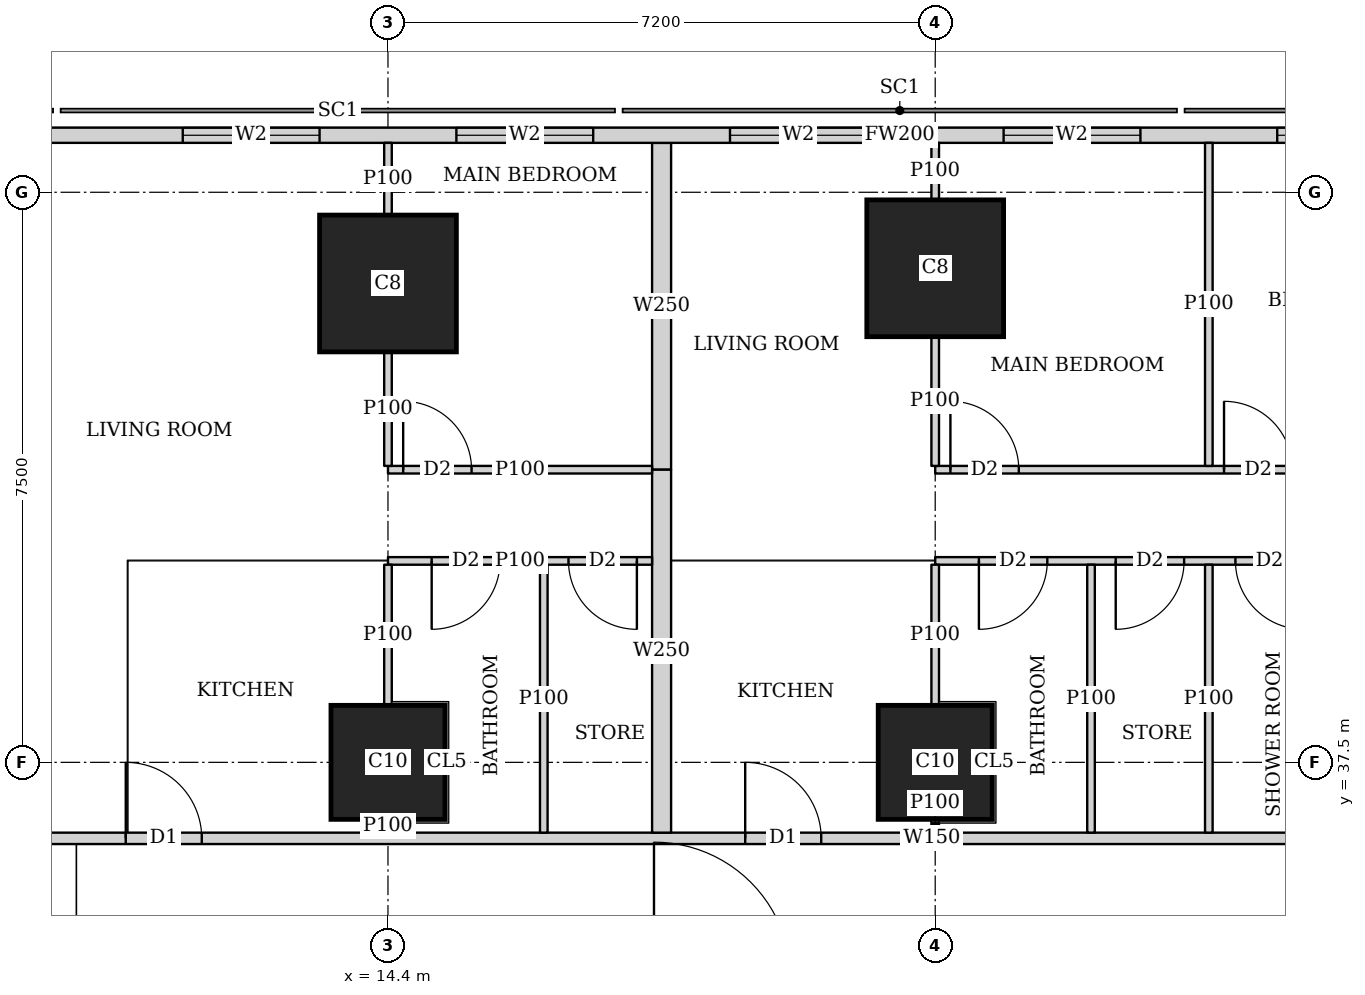
"""IFC4 building model, lengths in metres.
Left out: names, types, materials, properties, quantities, classifications, styles, units other than length and angle.
Written with IfcOpenShell. Run it as: python <this file> out.ifc"""

import sys

from ifc_helpers import new_model, si_unit, direction, frame, frame_2d, origin, origin_2d, place, context, subcontext, project, spatial, rectangle, extrude, element, fill, save


model = new_model("IFC4")
c1 = context("Model", 3, precision=1e-05, world=origin(), true_north=direction((0.0, 1.0)))
c2 = subcontext(c1, "Body", "Model", "MODEL_VIEW")
j1 = project(units=[si_unit("LENGTHUNIT", "METRE"), si_unit("PLANEANGLEUNIT", "RADIAN")], contexts=[c1])
p1 = place(None, origin())
s1 = spatial("IfcSite", under=j1, at=p1, CompositionType="ELEMENT")
p2 = place(p1, origin())
s2 = spatial("IfcBuilding", under=s1, at=p2, CompositionType="ELEMENT")
p3 = place(p2, frame((0.0, 0.0, 139.55)))
s3 = spatial("IfcBuildingStorey", under=s2, at=p3, CompositionType="ELEMENT", Elevation=139.55)
for number, where, z_axis, x_axis in (
    (1, (14.4, 37.5, 0.0), (0.0, 0.0, 1.0), (1.0, 0.0, 0.0)),
    (2, (21.6, 37.5, 0.0), (0.0, 0.0, 1.0), (1.0, 0.0, 0.0)),
):
    element("IfcColumn", number, at=place(p3, frame(where, z_axis=z_axis, x_axis=x_axis)), inside=s3, PredefinedType="COLUMN", context=c2, shape_type="SweptSolid", body=[
        extrude(rectangle(XDim=1.5, YDim=1.5, at=origin_2d()), origin(), (0.0, 0.0, 1.0), 3.75),
    ])
for number, where, z_axis, x_axis in (
    (3, (14.4, 43.8, 0.0), (0.0, 0.0, 1.0), (1.0, 0.0, 0.0)),
    (4, (21.6, 44.0, 0.0), (0.0, 0.0, 1.0), (1.0, 0.0, 0.0)),
):
    element("IfcColumn", number, at=place(p3, frame(where, z_axis=z_axis, x_axis=x_axis)), inside=s3, PredefinedType="COLUMN", context=c2, shape_type="SweptSolid", body=[
        extrude(rectangle(XDim=1.8, YDim=1.8, at=origin_2d()), origin(), (0.0, 0.0, 1.0), 3.75),
    ])
p4 = place(p3, frame((40.106, 45.75, 0.0), z_axis=(0.0, 0.0, 1.0), x_axis=(-1.0, 0.0, 0.0)))
e5 = element("IfcWall", 5, at=p4, inside=s3, PredefinedType="SOLIDWALL", context=c2, shape_type="SweptSolid", body=[
    extrude(rectangle(XDim=37.943, YDim=0.2, at=frame_2d((18.971, 0.0))), origin(), (0.0, 0.0, 1.0), 3.5),
])
p5 = place(p4, frame((8.606, 0.0, 0.9)))
e6 = element("IfcOpeningElement", 6, at=p5, cuts=e5, PredefinedType="OPENING", context=c2, shape_type="SweptSolid", body=[
    extrude(rectangle(XDim=1.8, YDim=1.5, at=frame_2d((0.9, 0.75))), frame((0.0, 0.11, 0.0), z_axis=(0.0, -1.0, 0.0), x_axis=(1.0, 0.0, 0.0)), (0.0, 0.0, 1.0), 0.22),
])
p6 = place(p4, frame((12.206, 0.0, 0.9)))
e7 = element("IfcOpeningElement", 7, at=p6, cuts=e5, PredefinedType="OPENING", context=c2, shape_type="SweptSolid", body=[
    extrude(rectangle(XDim=1.8, YDim=1.5, at=frame_2d((0.9, 0.75))), frame((0.0, 0.11, 0.0), z_axis=(0.0, -1.0, 0.0), x_axis=(1.0, 0.0, 0.0)), (0.0, 0.0, 1.0), 0.22),
])
p7 = place(p4, frame((15.806, 0.0, 0.9)))
e8 = element("IfcOpeningElement", 8, at=p7, cuts=e5, PredefinedType="OPENING", context=c2, shape_type="SweptSolid", body=[
    extrude(rectangle(XDim=1.8, YDim=1.5, at=frame_2d((0.9, 0.75))), frame((0.0, 0.11, 0.0), z_axis=(0.0, -1.0, 0.0), x_axis=(1.0, 0.0, 0.0)), (0.0, 0.0, 1.0), 0.22),
])
p8 = place(p4, frame((19.406, 0.0, 0.9)))
e9 = element("IfcOpeningElement", 9, at=p8, cuts=e5, PredefinedType="OPENING", context=c2, shape_type="SweptSolid", body=[
    extrude(rectangle(XDim=1.8, YDim=1.5, at=frame_2d((0.9, 0.75))), frame((0.0, 0.11, 0.0), z_axis=(0.0, -1.0, 0.0), x_axis=(1.0, 0.0, 0.0)), (0.0, 0.0, 1.0), 0.22),
])
p9 = place(p4, frame((23.006, 0.0, 0.9)))
e10 = element("IfcOpeningElement", 10, at=p9, cuts=e5, PredefinedType="OPENING", context=c2, shape_type="SweptSolid", body=[
    extrude(rectangle(XDim=1.8, YDim=1.5, at=frame_2d((0.9, 0.75))), frame((0.0, 0.11, 0.0), z_axis=(0.0, -1.0, 0.0), x_axis=(1.0, 0.0, 0.0)), (0.0, 0.0, 1.0), 0.22),
])
p10 = place(p4, frame((26.606, 0.0, 0.9)))
e11 = element("IfcOpeningElement", 11, at=p10, cuts=e5, PredefinedType="OPENING", context=c2, shape_type="SweptSolid", body=[
    extrude(rectangle(XDim=1.8, YDim=1.5, at=frame_2d((0.9, 0.75))), frame((0.0, 0.11, 0.0), z_axis=(0.0, -1.0, 0.0), x_axis=(1.0, 0.0, 0.0)), (0.0, 0.0, 1.0), 0.22),
])
p11 = place(p3, frame((8.35, 36.5, 0.0), z_axis=(0.0, 0.0, 1.0), x_axis=(1.0, 0.0, 0.0)))
e12 = element("IfcWall", 12, at=p11, inside=s3, PredefinedType="SOLIDWALL", context=c2, shape_type="SweptSolid", body=[
    extrude(rectangle(XDim=26.415, YDim=0.15, at=frame_2d((13.208, 0.0))), origin(), (0.0, 0.0, 1.0), 3.5),
])
p12 = place(p11, frame((2.6, 0.0, 0.0)))
e13 = element("IfcOpeningElement", 13, at=p12, cuts=e12, PredefinedType="OPENING", context=c2, shape_type="SweptSolid", body=[
    extrude(rectangle(XDim=1.0, YDim=2.1, at=frame_2d((0.5, 1.05))), frame((0.0, 0.085, 0.0), z_axis=(0.0, -1.0, 0.0), x_axis=(1.0, 0.0, 0.0)), (0.0, 0.0, 1.0), 0.17),
])
p13 = place(p11, frame((10.75, 0.0, 0.0)))
e14 = element("IfcOpeningElement", 14, at=p13, cuts=e12, PredefinedType="OPENING", context=c2, shape_type="SweptSolid", body=[
    extrude(rectangle(XDim=1.0, YDim=2.1, at=frame_2d((0.5, 1.05))), frame((0.0, 0.085, 0.0), z_axis=(0.0, -1.0, 0.0), x_axis=(1.0, 0.0, 0.0)), (0.0, 0.0, 1.0), 0.17),
])
p14 = place(p3, frame((14.4, 41.35, 0.0), z_axis=(0.0, 0.0, 1.0), x_axis=(1.0, 0.0, 0.0)))
e15 = element("IfcWall", 15, at=p14, inside=s3, PredefinedType="PARTITIONING", context=c2, shape_type="SweptSolid", body=[
    extrude(rectangle(XDim=3.475, YDim=0.1, at=frame_2d((1.738, 0.0))), origin(), (0.0, 0.0, 1.0), 3.5),
])
p15 = place(p14, frame((0.2, 0.0, 0.0)))
e16 = element("IfcOpeningElement", 16, at=p15, cuts=e15, PredefinedType="OPENING", context=c2, shape_type="SweptSolid", body=[
    extrude(rectangle(XDim=0.9, YDim=2.1, at=frame_2d((0.45, 1.05))), frame((0.0, 0.06, 0.0), z_axis=(0.0, -1.0, 0.0), x_axis=(1.0, 0.0, 0.0)), (0.0, 0.0, 1.0), 0.12),
])
p16 = place(p3, frame((14.4, 40.15, 0.0), z_axis=(0.0, 0.0, 1.0), x_axis=(1.0, 0.0, 0.0)))
e17 = element("IfcWall", 17, at=p16, inside=s3, PredefinedType="PARTITIONING", context=c2, shape_type="SweptSolid", body=[
    extrude(rectangle(XDim=3.475, YDim=0.1, at=frame_2d((1.738, 0.0))), origin(), (0.0, 0.0, 1.0), 3.5),
])
p17 = place(p16, frame((0.575, 0.0, 0.0)))
e18 = element("IfcOpeningElement", 18, at=p17, cuts=e17, PredefinedType="OPENING", context=c2, shape_type="SweptSolid", body=[
    extrude(rectangle(XDim=0.9, YDim=2.1, at=frame_2d((0.45, 1.05))), frame((0.0, 0.06, 0.0), z_axis=(0.0, -1.0, 0.0), x_axis=(1.0, 0.0, 0.0)), (0.0, 0.0, 1.0), 0.12),
])
p18 = place(p16, frame((2.375, 0.0, 0.0)))
e19 = element("IfcOpeningElement", 19, at=p18, cuts=e17, PredefinedType="OPENING", context=c2, shape_type="SweptSolid", body=[
    extrude(rectangle(XDim=0.9, YDim=2.1, at=frame_2d((0.45, 1.05))), frame((0.0, 0.06, 0.0), z_axis=(0.0, -1.0, 0.0), x_axis=(1.0, 0.0, 0.0)), (0.0, 0.0, 1.0), 0.12),
])
p19 = place(p3, frame((14.4, 41.4, 0.0), z_axis=(0.0, 0.0, 1.0), x_axis=(0.0, 1.0, 0.0)))
e20 = element("IfcWall", 20, at=p19, inside=s3, PredefinedType="PARTITIONING", context=c2, shape_type="SweptSolid", body=[
    extrude(rectangle(XDim=1.499, YDim=0.1, at=frame_2d((0.75, 0.0))), origin(), (0.0, 0.0, 1.0), 3.5),
])
p20 = place(p3, frame((14.4, 44.701, 0.0), z_axis=(0.0, 0.0, 1.0), x_axis=(0.0, 1.0, 0.0)))
e21 = element("IfcWall", 21, at=p20, inside=s3, PredefinedType="PARTITIONING", context=c2, shape_type="SweptSolid", body=[
    extrude(rectangle(XDim=0.949, YDim=0.1, at=frame_2d((0.475, 0.0))), origin(), (0.0, 0.0, 1.0), 3.5),
])
p21 = place(p3, frame((14.4, 36.575, 0.0), z_axis=(0.0, 0.0, 1.0), x_axis=(0.0, 1.0, 0.0)))
e22 = element("IfcWall", 22, at=p21, inside=s3, PredefinedType="PARTITIONING", context=c2, shape_type="SweptSolid", body=[
    extrude(rectangle(XDim=0.174, YDim=0.1, at=frame_2d((0.087, 0.0))), origin(), (0.0, 0.0, 1.0), 3.5),
])
p22 = place(p3, frame((14.4, 38.251, 0.0), z_axis=(0.0, 0.0, 1.0), x_axis=(0.0, 1.0, 0.0)))
e23 = element("IfcWall", 23, at=p22, inside=s3, PredefinedType="PARTITIONING", context=c2, shape_type="SweptSolid", body=[
    extrude(rectangle(XDim=1.849, YDim=0.1, at=frame_2d((0.925, 0.0))), origin(), (0.0, 0.0, 1.0), 3.5),
])
p23 = place(p3, frame((16.45, 36.575, 0.0), z_axis=(0.0, 0.0, 1.0), x_axis=(0.0, 1.0, 0.0)))
e24 = element("IfcWall", 24, at=p23, inside=s3, PredefinedType="PARTITIONING", context=c2, shape_type="SweptSolid", body=[
    extrude(rectangle(XDim=3.525, YDim=0.1, at=frame_2d((1.763, 0.0))), origin(), (0.0, 0.0, 1.0), 3.5),
])
p24 = place(p3, frame((21.6, 41.35, 0.0), z_axis=(0.0, 0.0, 1.0), x_axis=(1.0, 0.0, 0.0)))
e25 = element("IfcWall", 25, at=p24, inside=s3, PredefinedType="PARTITIONING", context=c2, shape_type="SweptSolid", body=[
    extrude(rectangle(XDim=12.253, YDim=0.1, at=frame_2d((6.126, 0.0))), origin(), (0.0, 0.0, 1.0), 3.5),
])
p25 = place(p24, frame((0.2, 0.0, 0.0)))
e26 = element("IfcOpeningElement", 26, at=p25, cuts=e25, PredefinedType="OPENING", context=c2, shape_type="SweptSolid", body=[
    extrude(rectangle(XDim=0.9, YDim=2.1, at=frame_2d((0.45, 1.05))), frame((0.0, 0.06, 0.0), z_axis=(0.0, -1.0, 0.0), x_axis=(1.0, 0.0, 0.0)), (0.0, 0.0, 1.0), 0.12),
])
p26 = place(p24, frame((3.8, 0.0, 0.0)))
e27 = element("IfcOpeningElement", 27, at=p26, cuts=e25, PredefinedType="OPENING", context=c2, shape_type="SweptSolid", body=[
    extrude(rectangle(XDim=0.9, YDim=2.1, at=frame_2d((0.45, 1.05))), frame((0.0, 0.06, 0.0), z_axis=(0.0, -1.0, 0.0), x_axis=(1.0, 0.0, 0.0)), (0.0, 0.0, 1.0), 0.12),
])
p27 = place(p24, frame((7.4, 0.0, 0.0)))
e28 = element("IfcOpeningElement", 28, at=p27, cuts=e25, PredefinedType="OPENING", context=c2, shape_type="SweptSolid", body=[
    extrude(rectangle(XDim=0.9, YDim=2.1, at=frame_2d((0.45, 1.05))), frame((0.0, 0.06, 0.0), z_axis=(0.0, -1.0, 0.0), x_axis=(1.0, 0.0, 0.0)), (0.0, 0.0, 1.0), 0.12),
])
p28 = place(p3, frame((21.6, 40.15, 0.0), z_axis=(0.0, 0.0, 1.0), x_axis=(1.0, 0.0, 0.0)))
e29 = element("IfcWall", 29, at=p28, inside=s3, PredefinedType="PARTITIONING", context=c2, shape_type="SweptSolid", body=[
    extrude(rectangle(XDim=12.48, YDim=0.1, at=frame_2d((6.24, 0.0))), origin(), (0.0, 0.0, 1.0), 3.5),
])
p29 = place(p28, frame((0.575, 0.0, 0.0)))
e30 = element("IfcOpeningElement", 30, at=p29, cuts=e29, PredefinedType="OPENING", context=c2, shape_type="SweptSolid", body=[
    extrude(rectangle(XDim=0.9, YDim=2.1, at=frame_2d((0.45, 1.05))), frame((0.0, 0.06, 0.0), z_axis=(0.0, -1.0, 0.0), x_axis=(1.0, 0.0, 0.0)), (0.0, 0.0, 1.0), 0.12),
])
p30 = place(p28, frame((3.95, 0.0, 0.0)))
e31 = element("IfcOpeningElement", 31, at=p30, cuts=e29, PredefinedType="OPENING", context=c2, shape_type="SweptSolid", body=[
    extrude(rectangle(XDim=0.9, YDim=2.1, at=frame_2d((0.45, 1.05))), frame((0.0, 0.06, 0.0), z_axis=(0.0, -1.0, 0.0), x_axis=(1.0, 0.0, 0.0)), (0.0, 0.0, 1.0), 0.12),
])
p31 = place(p28, frame((7.6, 0.0, 0.0)))
e32 = element("IfcOpeningElement", 32, at=p31, cuts=e29, PredefinedType="OPENING", context=c2, shape_type="SweptSolid", body=[
    extrude(rectangle(XDim=0.9, YDim=2.1, at=frame_2d((0.45, 1.05))), frame((0.0, 0.06, 0.0), z_axis=(0.0, -1.0, 0.0), x_axis=(1.0, 0.0, 0.0)), (0.0, 0.0, 1.0), 0.12),
])
p32 = place(p28, frame((11.43, 0.0, 0.0)))
e33 = element("IfcOpeningElement", 33, at=p32, cuts=e29, PredefinedType="OPENING", context=c2, shape_type="SweptSolid", body=[
    extrude(rectangle(XDim=0.9, YDim=2.1, at=frame_2d((0.45, 1.05))), frame((0.0, 0.06, 0.0), z_axis=(0.0, -1.0, 0.0), x_axis=(1.0, 0.0, 0.0)), (0.0, 0.0, 1.0), 0.12),
])
p33 = place(p28, frame((2.375, 0.0, 0.0)))
e34 = element("IfcOpeningElement", 34, at=p33, cuts=e29, PredefinedType="OPENING", context=c2, shape_type="SweptSolid", body=[
    extrude(rectangle(XDim=0.9, YDim=2.1, at=frame_2d((0.45, 1.05))), frame((0.0, 0.06, 0.0), z_axis=(0.0, -1.0, 0.0), x_axis=(1.0, 0.0, 0.0)), (0.0, 0.0, 1.0), 0.12),
])
p34 = place(p28, frame((5.75, 0.0, 0.0)))
e35 = element("IfcOpeningElement", 35, at=p34, cuts=e29, PredefinedType="OPENING", context=c2, shape_type="SweptSolid", body=[
    extrude(rectangle(XDim=0.9, YDim=2.1, at=frame_2d((0.45, 1.05))), frame((0.0, 0.06, 0.0), z_axis=(0.0, -1.0, 0.0), x_axis=(1.0, 0.0, 0.0)), (0.0, 0.0, 1.0), 0.12),
])
p35 = place(p28, frame((9.4, 0.0, 0.0)))
e36 = element("IfcOpeningElement", 36, at=p35, cuts=e29, PredefinedType="OPENING", context=c2, shape_type="SweptSolid", body=[
    extrude(rectangle(XDim=0.9, YDim=2.1, at=frame_2d((0.45, 1.05))), frame((0.0, 0.06, 0.0), z_axis=(0.0, -1.0, 0.0), x_axis=(1.0, 0.0, 0.0)), (0.0, 0.0, 1.0), 0.12),
])
p36 = place(p3, frame((21.6, 41.4, 0.0), z_axis=(0.0, 0.0, 1.0), x_axis=(0.0, 1.0, 0.0)))
e37 = element("IfcWall", 37, at=p36, inside=s3, PredefinedType="PARTITIONING", context=c2, shape_type="SweptSolid", body=[
    extrude(rectangle(XDim=1.699, YDim=0.1, at=frame_2d((0.85, 0.0))), origin(), (0.0, 0.0, 1.0), 3.5),
])
p37 = place(p3, frame((21.6, 44.901, 0.0), z_axis=(0.0, 0.0, 1.0), x_axis=(0.0, 1.0, 0.0)))
e38 = element("IfcWall", 38, at=p37, inside=s3, PredefinedType="PARTITIONING", context=c2, shape_type="SweptSolid", body=[
    extrude(rectangle(XDim=0.749, YDim=0.1, at=frame_2d((0.375, 0.0))), origin(), (0.0, 0.0, 1.0), 3.5),
])
p38 = place(p3, frame((25.2, 41.4, 0.0), z_axis=(0.0, 0.0, 1.0), x_axis=(0.0, 1.0, 0.0)))
e39 = element("IfcWall", 39, at=p38, inside=s3, PredefinedType="PARTITIONING", context=c2, shape_type="SweptSolid", body=[
    extrude(rectangle(XDim=4.25, YDim=0.1, at=frame_2d((2.125, 0.0))), origin(), (0.0, 0.0, 1.0), 2.1),
])
p39 = place(p3, frame((21.6, 36.575, 0.0), z_axis=(0.0, 0.0, 1.0), x_axis=(0.0, 1.0, 0.0)))
e40 = element("IfcWall", 40, at=p39, inside=s3, PredefinedType="PARTITIONING", context=c2, shape_type="SweptSolid", body=[
    extrude(rectangle(XDim=0.174, YDim=0.1, at=frame_2d((0.087, 0.0))), origin(), (0.0, 0.0, 1.0), 3.5),
])
p40 = place(p3, frame((21.6, 38.251, 0.0), z_axis=(0.0, 0.0, 1.0), x_axis=(0.0, 1.0, 0.0)))
e41 = element("IfcWall", 41, at=p40, inside=s3, PredefinedType="PARTITIONING", context=c2, shape_type="SweptSolid", body=[
    extrude(rectangle(XDim=1.849, YDim=0.1, at=frame_2d((0.925, 0.0))), origin(), (0.0, 0.0, 1.0), 3.5),
])
for number, where, z_axis, x_axis in (
    (42, (25.2, 36.575, 0.0), (0.0, 0.0, 1.0), (0.0, 1.0, 0.0)),
    (43, (23.65, 36.575, 0.0), (0.0, 0.0, 1.0), (0.0, 1.0, 0.0)),
):
    element("IfcWall", number, at=place(p3, frame(where, z_axis=z_axis, x_axis=x_axis)), inside=s3, PredefinedType="PARTITIONING", context=c2, shape_type="SweptSolid", body=[
        extrude(rectangle(XDim=3.525, YDim=0.1, at=frame_2d((1.763, 0.0))), origin(), (0.0, 0.0, 1.0), 3.5),
    ])
p41 = place(p3, frame((18.0, 41.35, 0.0), z_axis=(0.0, 0.0, 1.0), x_axis=(0.0, 1.0, 0.0)))
e44 = element("IfcWall", 44, at=p41, inside=s3, PredefinedType="SOLIDWALL", context=c2, shape_type="SweptSolid", body=[
    extrude(rectangle(XDim=4.3, YDim=0.25, at=frame_2d((2.15, 0.0))), origin(), (0.0, 0.0, 1.0), 2.1),
])
p42 = place(p3, frame((18.0, 36.575, 0.0), z_axis=(0.0, 0.0, 1.0), x_axis=(0.0, 1.0, 0.0)))
e45 = element("IfcWall", 45, at=p42, inside=s3, PredefinedType="SOLIDWALL", context=c2, shape_type="SweptSolid", body=[
    extrude(rectangle(XDim=4.775, YDim=0.25, at=frame_2d((2.388, 0.0))), origin(), (0.0, 0.0, 1.0), 3.5),
])
p43 = place(p6, origin())
e46 = element("IfcWindow", 46, at=p43, inside=s3, PartitioningType="SINGLE_PANEL", PredefinedType="WINDOW", context=c2, shape_type="SweptSolid", body=[
    extrude(rectangle(XDim=1.8, YDim=1.5, at=frame_2d((0.9, 0.75))), frame((0.0, 0.03, 0.0), z_axis=(0.0, -1.0, 0.0), x_axis=(1.0, 0.0, 0.0)), (0.0, 0.0, 1.0), 0.06),
])
fill(e7, e46)
p44 = place(p7, origin())
e47 = element("IfcWindow", 47, at=p44, inside=s3, PartitioningType="SINGLE_PANEL", PredefinedType="WINDOW", context=c2, shape_type="SweptSolid", body=[
    extrude(rectangle(XDim=1.8, YDim=1.5, at=frame_2d((0.9, 0.75))), frame((0.0, 0.03, 0.0), z_axis=(0.0, -1.0, 0.0), x_axis=(1.0, 0.0, 0.0)), (0.0, 0.0, 1.0), 0.06),
])
fill(e8, e47)
p45 = place(p8, origin())
e48 = element("IfcWindow", 48, at=p45, inside=s3, PartitioningType="SINGLE_PANEL", PredefinedType="WINDOW", context=c2, shape_type="SweptSolid", body=[
    extrude(rectangle(XDim=1.8, YDim=1.5, at=frame_2d((0.9, 0.75))), frame((0.0, 0.03, 0.0), z_axis=(0.0, -1.0, 0.0), x_axis=(1.0, 0.0, 0.0)), (0.0, 0.0, 1.0), 0.06),
])
fill(e9, e48)
p46 = place(p9, origin())
e49 = element("IfcWindow", 49, at=p46, inside=s3, PartitioningType="SINGLE_PANEL", PredefinedType="WINDOW", context=c2, shape_type="SweptSolid", body=[
    extrude(rectangle(XDim=1.8, YDim=1.5, at=frame_2d((0.9, 0.75))), frame((0.0, 0.03, 0.0), z_axis=(0.0, -1.0, 0.0), x_axis=(1.0, 0.0, 0.0)), (0.0, 0.0, 1.0), 0.06),
])
fill(e10, e49)
p47 = place(p10, origin())
e50 = element("IfcWindow", 50, at=p47, inside=s3, PartitioningType="SINGLE_PANEL", PredefinedType="WINDOW", context=c2, shape_type="SweptSolid", body=[
    extrude(rectangle(XDim=1.8, YDim=1.5, at=frame_2d((0.9, 0.75))), frame((0.0, 0.03, 0.0), z_axis=(0.0, -1.0, 0.0), x_axis=(1.0, 0.0, 0.0)), (0.0, 0.0, 1.0), 0.06),
])
fill(e11, e50)
p48 = place(p15, origin())
e51 = element("IfcDoor", 51, at=p48, inside=s3, OperationType="SINGLE_SWING_LEFT", PredefinedType="DOOR", context=c2, shape_type="SweptSolid", body=[
    extrude(rectangle(XDim=0.9, YDim=2.1, at=frame_2d((0.45, 1.05))), frame((0.0, 0.025, 0.0), z_axis=(0.0, -1.0, 0.0), x_axis=(1.0, 0.0, 0.0)), (0.0, 0.0, 1.0), 0.05),
])
fill(e16, e51)
p49 = place(p17, origin())
e52 = element("IfcDoor", 52, at=p49, inside=s3, OperationType="SINGLE_SWING_RIGHT", PredefinedType="DOOR", context=c2, shape_type="SweptSolid", body=[
    extrude(rectangle(XDim=0.9, YDim=2.1, at=frame_2d((0.45, 1.05))), frame((0.0, 0.025, 0.0), z_axis=(0.0, -1.0, 0.0), x_axis=(1.0, 0.0, 0.0)), (0.0, 0.0, 1.0), 0.05),
])
fill(e18, e52)
p50 = place(p18, origin())
e53 = element("IfcDoor", 53, at=p50, inside=s3, OperationType="SINGLE_SWING_LEFT", PredefinedType="DOOR", context=c2, shape_type="SweptSolid", body=[
    extrude(rectangle(XDim=0.9, YDim=2.1, at=frame_2d((0.45, 1.05))), frame((0.0, 0.025, 0.0), z_axis=(0.0, -1.0, 0.0), x_axis=(1.0, 0.0, 0.0)), (0.0, 0.0, 1.0), 0.05),
])
fill(e19, e53)
p51 = place(p12, origin())
e54 = element("IfcDoor", 54, at=p51, inside=s3, OperationType="SINGLE_SWING_LEFT", PredefinedType="DOOR", context=c2, shape_type="SweptSolid", body=[
    extrude(rectangle(XDim=1.0, YDim=2.1, at=frame_2d((0.5, 1.05))), frame((0.0, 0.025, 0.0), z_axis=(0.0, -1.0, 0.0), x_axis=(1.0, 0.0, 0.0)), (0.0, 0.0, 1.0), 0.05),
])
fill(e13, e54)
p52 = place(p25, origin())
e55 = element("IfcDoor", 55, at=p52, inside=s3, OperationType="SINGLE_SWING_LEFT", PredefinedType="DOOR", context=c2, shape_type="SweptSolid", body=[
    extrude(rectangle(XDim=0.9, YDim=2.1, at=frame_2d((0.45, 1.05))), frame((0.0, 0.025, 0.0), z_axis=(0.0, -1.0, 0.0), x_axis=(1.0, 0.0, 0.0)), (0.0, 0.0, 1.0), 0.05),
])
fill(e26, e55)
p53 = place(p26, origin())
e56 = element("IfcDoor", 56, at=p53, inside=s3, OperationType="SINGLE_SWING_LEFT", PredefinedType="DOOR", context=c2, shape_type="SweptSolid", body=[
    extrude(rectangle(XDim=0.9, YDim=2.1, at=frame_2d((0.45, 1.05))), frame((0.0, 0.025, 0.0), z_axis=(0.0, -1.0, 0.0), x_axis=(1.0, 0.0, 0.0)), (0.0, 0.0, 1.0), 0.05),
])
fill(e27, e56)
p54 = place(p29, origin())
e57 = element("IfcDoor", 57, at=p54, inside=s3, OperationType="SINGLE_SWING_RIGHT", PredefinedType="DOOR", context=c2, shape_type="SweptSolid", body=[
    extrude(rectangle(XDim=0.9, YDim=2.1, at=frame_2d((0.45, 1.05))), frame((0.0, 0.025, 0.0), z_axis=(0.0, -1.0, 0.0), x_axis=(1.0, 0.0, 0.0)), (0.0, 0.0, 1.0), 0.05),
])
fill(e30, e57)
p55 = place(p30, origin())
e58 = element("IfcDoor", 58, at=p55, inside=s3, OperationType="SINGLE_SWING_LEFT", PredefinedType="DOOR", context=c2, shape_type="SweptSolid", body=[
    extrude(rectangle(XDim=0.9, YDim=2.1, at=frame_2d((0.45, 1.05))), frame((0.0, 0.025, 0.0), z_axis=(0.0, -1.0, 0.0), x_axis=(1.0, 0.0, 0.0)), (0.0, 0.0, 1.0), 0.05),
])
fill(e31, e58)
p56 = place(p33, origin())
e59 = element("IfcDoor", 59, at=p56, inside=s3, OperationType="SINGLE_SWING_RIGHT", PredefinedType="DOOR", context=c2, shape_type="SweptSolid", body=[
    extrude(rectangle(XDim=0.9, YDim=2.1, at=frame_2d((0.45, 1.05))), frame((0.0, 0.025, 0.0), z_axis=(0.0, -1.0, 0.0), x_axis=(1.0, 0.0, 0.0)), (0.0, 0.0, 1.0), 0.05),
])
fill(e34, e59)
p57 = place(p13, origin())
e60 = element("IfcDoor", 60, at=p57, inside=s3, OperationType="SINGLE_SWING_LEFT", PredefinedType="DOOR", context=c2, shape_type="SweptSolid", body=[
    extrude(rectangle(XDim=1.0, YDim=2.1, at=frame_2d((0.5, 1.05))), frame((0.0, 0.025, 0.0), z_axis=(0.0, -1.0, 0.0), x_axis=(1.0, 0.0, 0.0)), (0.0, 0.0, 1.0), 0.05),
])
fill(e14, e60)
save(model, sys.argv[1])
